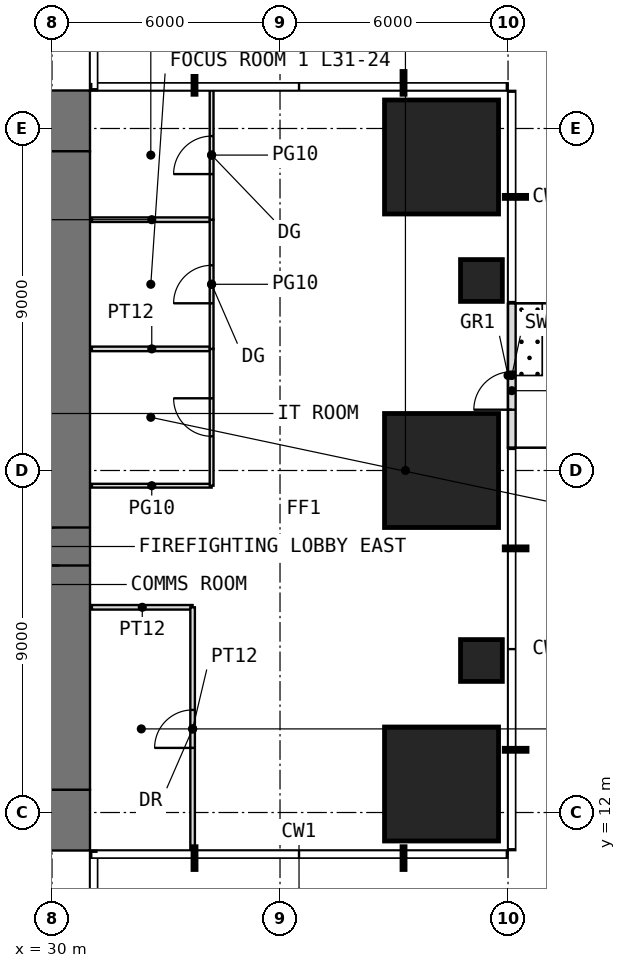
"""IFC4 building model, lengths in metres.
Left out: names, types, materials, properties, quantities, classifications, styles, units other than length and angle.
Written with IfcOpenShell. Run it as: python <this file> out.ifc"""

import sys

from ifc_helpers import new_model, si_unit, direction, frame, frame_2d, origin, origin_2d, place, context, subcontext, project, spatial, rectangle, extrude, element, fill, save


model = new_model("IFC4")
c1 = context("Model", 3, precision=1e-05, world=origin(), true_north=direction((0.0, 1.0)))
c2 = subcontext(c1, "Body", "Model", "MODEL_VIEW")
j1 = project(units=[si_unit("LENGTHUNIT", "METRE"), si_unit("PLANEANGLEUNIT", "RADIAN")], contexts=[c1])
p1 = place(None, origin())
s1 = spatial("IfcSite", under=j1, at=p1, CompositionType="ELEMENT")
p2 = place(p1, origin())
s2 = spatial("IfcBuilding", under=s1, at=p2, CompositionType="ELEMENT")
p3 = place(p2, frame((0.0, 0.0, 132.5)))
s3 = spatial("IfcBuildingStorey", under=s2, at=p3, CompositionType="ELEMENT", Elevation=132.5)
p4 = place(p3, frame((40.25, 12.75, 0.0), z_axis=(0.0, 0.0, 1.0), x_axis=(1.0, 0.0, 0.0)))
e1 = element("IfcColumn", 1, at=p4, inside=s3, PredefinedType="COLUMN", context=c2, shape_type="SweptSolid", body=[
    extrude(rectangle(XDim=3.0, YDim=3.0, at=origin_2d()), origin(), (0.0, 0.0, 1.0), 4.0),
])
p5 = place(p3, frame((41.3, 16.0, 0.0), z_axis=(0.0, 0.0, 1.0), x_axis=(1.0, 0.0, 0.0)))
e2 = element("IfcColumn", 2, at=p5, inside=s3, PredefinedType="COLUMN", context=c2, shape_type="SweptSolid", body=[
    extrude(rectangle(XDim=1.1, YDim=1.1, at=origin_2d()), origin(), (0.0, 0.0, 1.0), 4.0),
])
p6 = place(p3, frame((40.25, 21.0, 0.0), z_axis=(0.0, 0.0, 1.0), x_axis=(1.0, 0.0, 0.0)))
e3 = element("IfcColumn", 3, at=p6, inside=s3, PredefinedType="COLUMN", context=c2, shape_type="SweptSolid", body=[
    extrude(rectangle(XDim=3.0, YDim=3.0, at=origin_2d()), origin(), (0.0, 0.0, 1.0), 4.0),
])
p7 = place(p3, frame((41.3, 26.0, 0.0), z_axis=(0.0, 0.0, 1.0), x_axis=(1.0, 0.0, 0.0)))
e4 = element("IfcColumn", 4, at=p7, inside=s3, PredefinedType="COLUMN", context=c2, shape_type="SweptSolid", body=[
    extrude(rectangle(XDim=1.1, YDim=1.1, at=origin_2d()), origin(), (0.0, 0.0, 1.0), 4.0),
])
p8 = place(p3, frame((40.25, 29.25, 0.0), z_axis=(0.0, 0.0, 1.0), x_axis=(1.0, 0.0, 0.0)))
e5 = element("IfcColumn", 5, at=p8, inside=s3, PredefinedType="COLUMN", context=c2, shape_type="SweptSolid", body=[
    extrude(rectangle(XDim=3.0, YDim=3.0, at=origin_2d()), origin(), (0.0, 0.0, 1.0), 4.0),
])
p9 = place(p3, frame((42.1, 21.6, 0.0), z_axis=(0.0, 0.0, 1.0), x_axis=(0.0, 1.0, 0.0)))
e6 = element("IfcWall", 6, at=p9, inside=s3, PredefinedType="USERDEFINED", context=c2, shape_type="SweptSolid", body=[
    extrude(rectangle(XDim=3.8, YDim=0.2, at=frame_2d((1.9, 0.0))), origin(), (0.0, 0.0, 1.0), 3.75),
])
p10 = place(p9, frame((1.0, 0.0, 0.0)))
e7 = element("IfcOpeningElement", 7, at=p10, cuts=e6, PredefinedType="OPENING", context=c2, shape_type="SweptSolid", body=[
    extrude(rectangle(XDim=1.0, YDim=2.4, at=frame_2d((0.5, 1.2))), frame((0.0, 0.11, 0.0), z_axis=(0.0, -1.0, 0.0), x_axis=(1.0, 0.0, 0.0)), (0.0, 0.0, 1.0), 0.22),
])
p11 = place(p3, frame((11.0, 11.8, -0.05), z_axis=(0.0, 0.0, 1.0), x_axis=(1.0, 0.0, 0.0)))
e8 = element("IfcWall", 8, at=p11, inside=s3, PredefinedType="SHEAR", context=c2, shape_type="SweptSolid", body=[
    extrude(rectangle(XDim=20.0, YDim=1.6, at=frame_2d((10.0, 0.0))), origin(), (0.0, 0.0, 1.0), 4.0),
])
p12 = place(p11, frame((9.0, 0.0, 0.05)))
e9 = element("IfcOpeningElement", 9, at=p12, cuts=e8, PredefinedType="OPENING", context=c2, shape_type="SweptSolid", body=[
    extrude(rectangle(XDim=2.0, YDim=2.2, at=frame_2d((1.0, 1.1))), frame((0.0, 0.81, 0.0), z_axis=(0.0, -1.0, 0.0), x_axis=(1.0, 0.0, 0.0)), (0.0, 0.0, 1.0), 1.62),
])
p13 = place(p3, frame((11.0, 30.2, -0.05), z_axis=(0.0, 0.0, 1.0), x_axis=(1.0, 0.0, 0.0)))
e10 = element("IfcWall", 10, at=p13, inside=s3, PredefinedType="SHEAR", context=c2, shape_type="SweptSolid", body=[
    extrude(rectangle(XDim=20.0, YDim=1.6, at=frame_2d((10.0, 0.0))), origin(), (0.0, 0.0, 1.0), 4.0),
])
p14 = place(p13, frame((9.0, 0.0, 0.05)))
e11 = element("IfcOpeningElement", 11, at=p14, cuts=e10, PredefinedType="OPENING", context=c2, shape_type="SweptSolid", body=[
    extrude(rectangle(XDim=2.0, YDim=2.2, at=frame_2d((1.0, 1.1))), frame((0.0, 0.81, 0.0), z_axis=(0.0, -1.0, 0.0), x_axis=(1.0, 0.0, 0.0)), (0.0, 0.0, 1.0), 1.62),
])
p15 = place(p3, frame((30.2, 12.6, -0.05), z_axis=(0.0, 0.0, 1.0), x_axis=(0.0, 1.0, 0.0)))
e12 = element("IfcWall", 12, at=p15, inside=s3, PredefinedType="SHEAR", context=c2, shape_type="SweptSolid", body=[
    extrude(rectangle(XDim=16.8, YDim=1.6, at=frame_2d((8.4, 0.0))), origin(), (0.0, 0.0, 1.0), 4.0),
])
p16 = place(p15, frame((5.9, 0.0, 0.05)))
e13 = element("IfcOpeningElement", 13, at=p16, cuts=e12, PredefinedType="OPENING", context=c2, shape_type="SweptSolid", body=[
    extrude(rectangle(XDim=1.0, YDim=2.2, at=frame_2d((0.5, 1.1))), frame((0.0, 0.81, 0.0), z_axis=(0.0, -1.0, 0.0), x_axis=(1.0, 0.0, 0.0)), (0.0, 0.0, 1.0), 1.62),
])
p17 = place(p3, frame((31.05, 17.4, 0.0), z_axis=(0.0, 0.0, 1.0), x_axis=(1.0, 0.0, 0.0)))
e14 = element("IfcWall", 14, at=p17, inside=s3, PredefinedType="PARTITIONING", context=c2, shape_type="SweptSolid", body=[
    extrude(rectangle(XDim=2.65, YDim=0.12, at=frame_2d((1.325, 0.0))), origin(), (0.0, 0.0, 1.0), 3.75),
])
p18 = place(p3, frame((31.05, 20.6, 0.0), z_axis=(0.0, 0.0, 1.0), x_axis=(1.0, 0.0, 0.0)))
e15 = element("IfcWall", 15, at=p18, inside=s3, PredefinedType="PARTITIONING", context=c2, shape_type="SweptSolid", body=[
    extrude(rectangle(XDim=3.15, YDim=0.1, at=frame_2d((1.575, 0.0))), origin(), (0.0, 0.0, 1.0), 3.75),
])
for number, where, z_axis, x_axis in (
    (16, (31.05, 24.2, 0.0), (0.0, 0.0, 1.0), (1.0, 0.0, 0.0)),
    (17, (31.05, 27.6, 0.0), (0.0, 0.0, 1.0), (1.0, 0.0, 0.0)),
):
    element("IfcWall", number, at=place(p3, frame(where, z_axis=z_axis, x_axis=x_axis)), inside=s3, PredefinedType="PARTITIONING", context=c2, shape_type="SweptSolid", body=[
        extrude(rectangle(XDim=3.15, YDim=0.12, at=frame_2d((1.575, 0.0))), origin(), (0.0, 0.0, 1.0), 3.75),
    ])
p19 = place(p3, frame((33.7, 11.0, 0.0), z_axis=(0.0, 0.0, 1.0), x_axis=(0.0, 1.0, 0.0)))
e18 = element("IfcWall", 18, at=p19, inside=s3, PredefinedType="PARTITIONING", context=c2, shape_type="SweptSolid", body=[
    extrude(rectangle(XDim=6.4, YDim=0.12, at=frame_2d((3.2, 0.0))), origin(), (0.0, 0.0, 1.0), 3.75),
])
p20 = place(p19, frame((2.7, 0.0, 0.0)))
e19 = element("IfcOpeningElement", 19, at=p20, cuts=e18, PredefinedType="OPENING", context=c2, shape_type="SweptSolid", body=[
    extrude(rectangle(XDim=1.0, YDim=2.2, at=frame_2d((0.5, 1.1))), frame((0.0, 0.07, 0.0), z_axis=(0.0, -1.0, 0.0), x_axis=(1.0, 0.0, 0.0)), (0.0, 0.0, 1.0), 0.14),
])
p21 = place(p3, frame((34.2, 20.6, 0.0), z_axis=(0.0, 0.0, 1.0), x_axis=(0.0, 1.0, 0.0)))
e20 = element("IfcWall", 20, at=p21, inside=s3, PredefinedType="PARTITIONING", context=c2, shape_type="SweptSolid", body=[
    extrude(rectangle(XDim=3.6, YDim=0.1, at=frame_2d((1.8, 0.0))), origin(), (0.0, 0.0, 1.0), 3.75),
])
p22 = place(p21, frame((1.3, 0.0, 0.0)))
e21 = element("IfcOpeningElement", 21, at=p22, cuts=e20, PredefinedType="OPENING", context=c2, shape_type="SweptSolid", body=[
    extrude(rectangle(XDim=1.0, YDim=2.4, at=frame_2d((0.5, 1.2))), frame((0.0, 0.06, 0.0), z_axis=(0.0, -1.0, 0.0), x_axis=(1.0, 0.0, 0.0)), (0.0, 0.0, 1.0), 0.12),
])
p23 = place(p3, frame((34.2, 24.2, 0.0), z_axis=(0.0, 0.0, 1.0), x_axis=(0.0, 1.0, 0.0)))
e22 = element("IfcWall", 22, at=p23, inside=s3, PredefinedType="PARTITIONING", context=c2, shape_type="SweptSolid", body=[
    extrude(rectangle(XDim=3.4, YDim=0.1, at=frame_2d((1.7, 0.0))), origin(), (0.0, 0.0, 1.0), 3.75),
])
p24 = place(p23, frame((1.2, 0.0, 0.0)))
e23 = element("IfcOpeningElement", 23, at=p24, cuts=e22, PredefinedType="OPENING", context=c2, shape_type="SweptSolid", body=[
    extrude(rectangle(XDim=1.0, YDim=2.4, at=frame_2d((0.5, 1.2))), frame((0.0, 0.06, 0.0), z_axis=(0.0, -1.0, 0.0), x_axis=(1.0, 0.0, 0.0)), (0.0, 0.0, 1.0), 0.12),
])
p25 = place(p3, frame((34.2, 27.6, 0.0), z_axis=(0.0, 0.0, 1.0), x_axis=(0.0, 1.0, 0.0)))
e24 = element("IfcWall", 24, at=p25, inside=s3, PredefinedType="PARTITIONING", context=c2, shape_type="SweptSolid", body=[
    extrude(rectangle(XDim=3.4, YDim=0.1, at=frame_2d((1.7, 0.0))), origin(), (0.0, 0.0, 1.0), 3.75),
])
p26 = place(p25, frame((1.2, 0.0, 0.0)))
e25 = element("IfcOpeningElement", 25, at=p26, cuts=e24, PredefinedType="OPENING", context=c2, shape_type="SweptSolid", body=[
    extrude(rectangle(XDim=1.0, YDim=2.4, at=frame_2d((0.5, 1.2))), frame((0.0, 0.06, 0.0), z_axis=(0.0, -1.0, 0.0), x_axis=(1.0, 0.0, 0.0)), (0.0, 0.0, 1.0), 0.12),
])
p27 = place(p10, origin())
e26 = element("IfcDoor", 26, at=p27, inside=s3, OperationType="SINGLE_SWING_LEFT", PredefinedType="DOOR", context=c2, shape_type="SweptSolid", body=[
    extrude(rectangle(XDim=1.0, YDim=2.4, at=frame_2d((0.5, 1.2))), frame((0.0, 0.025, 0.0), z_axis=(0.0, -1.0, 0.0), x_axis=(1.0, 0.0, 0.0)), (0.0, 0.0, 1.0), 0.05),
])
fill(e7, e26)
p28 = place(p16, origin())
e27 = element("IfcDoor", 27, at=p28, inside=s3, OperationType="SINGLE_SWING_LEFT", PredefinedType="DOOR", context=c2, shape_type="SweptSolid", body=[
    extrude(rectangle(XDim=1.0, YDim=2.2, at=frame_2d((0.5, 1.1))), frame((0.0, 0.025, 0.0), z_axis=(0.0, -1.0, 0.0), x_axis=(1.0, 0.0, 0.0)), (0.0, 0.0, 1.0), 0.05),
])
fill(e13, e27)
p29 = place(p20, origin())
e28 = element("IfcDoor", 28, at=p29, inside=s3, OperationType="SINGLE_SWING_LEFT", PredefinedType="DOOR", context=c2, shape_type="SweptSolid", body=[
    extrude(rectangle(XDim=1.0, YDim=2.2, at=frame_2d((0.5, 1.1))), frame((0.0, 0.025, 0.0), z_axis=(0.0, -1.0, 0.0), x_axis=(1.0, 0.0, 0.0)), (0.0, 0.0, 1.0), 0.05),
])
fill(e19, e28)
p30 = place(p22, origin())
e29 = element("IfcDoor", 29, at=p30, inside=s3, OperationType="SINGLE_SWING_RIGHT", PredefinedType="DOOR", context=c2, shape_type="SweptSolid", body=[
    extrude(rectangle(XDim=1.0, YDim=2.4, at=frame_2d((0.5, 1.2))), frame((0.0, 0.025, 0.0), z_axis=(0.0, -1.0, 0.0), x_axis=(1.0, 0.0, 0.0)), (0.0, 0.0, 1.0), 0.05),
])
fill(e21, e29)
p31 = place(p24, origin())
e30 = element("IfcDoor", 30, at=p31, inside=s3, OperationType="SINGLE_SWING_LEFT", PredefinedType="DOOR", context=c2, shape_type="SweptSolid", body=[
    extrude(rectangle(XDim=1.0, YDim=2.4, at=frame_2d((0.5, 1.2))), frame((0.0, 0.025, 0.0), z_axis=(0.0, -1.0, 0.0), x_axis=(1.0, 0.0, 0.0)), (0.0, 0.0, 1.0), 0.05),
])
fill(e23, e30)
p32 = place(p26, origin())
e31 = element("IfcDoor", 31, at=p32, inside=s3, OperationType="SINGLE_SWING_LEFT", PredefinedType="DOOR", context=c2, shape_type="SweptSolid", body=[
    extrude(rectangle(XDim=1.0, YDim=2.4, at=frame_2d((0.5, 1.2))), frame((0.0, 0.025, 0.0), z_axis=(0.0, -1.0, 0.0), x_axis=(1.0, 0.0, 0.0)), (0.0, 0.0, 1.0), 0.05),
])
fill(e25, e31)
save(model, sys.argv[1])
